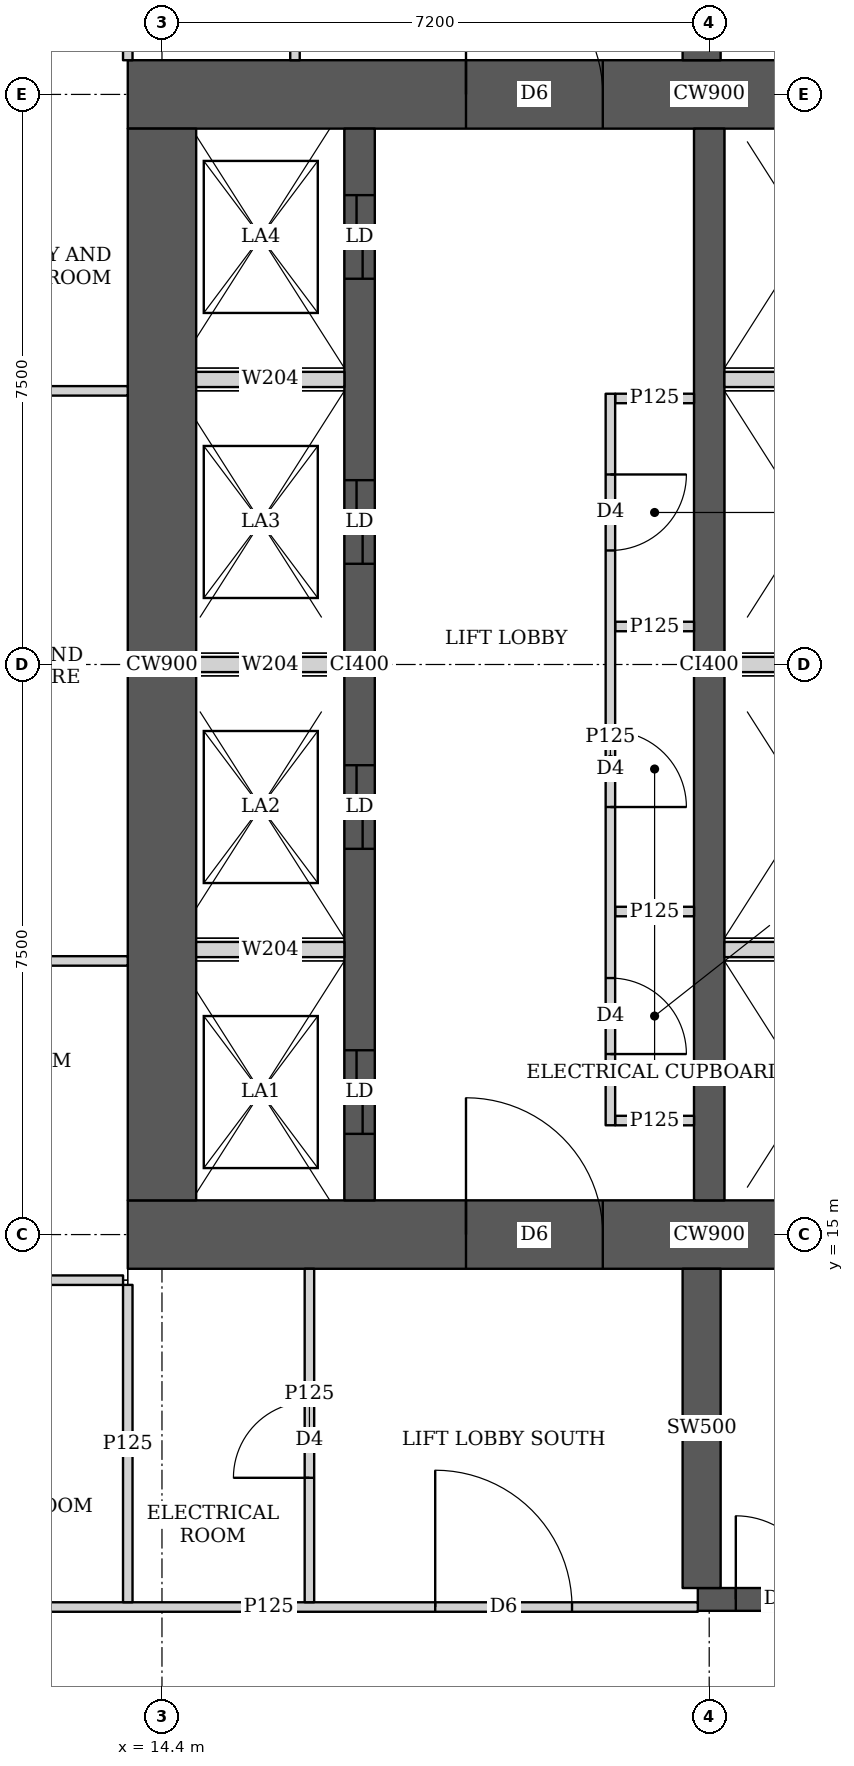
"""IFC4 building model, lengths in metres.
Left out: names, types, materials, properties, quantities, classifications, styles, units other than length and angle.
Written with IfcOpenShell. Run it as: python <this file> out.ifc"""

import sys

from ifc_helpers import new_model, si_unit, direction, frame, frame_2d, origin, place, context, subcontext, project, spatial, rectangle, extrude, element, fill, save


model = new_model("IFC4")
c1 = context("Model", 3, precision=1e-05, world=origin(), true_north=direction((0.0, 1.0)))
c2 = subcontext(c1, "Body", "Model", "MODEL_VIEW")
j1 = project(units=[si_unit("LENGTHUNIT", "METRE"), si_unit("PLANEANGLEUNIT", "RADIAN")], contexts=[c1])
p1 = place(None, origin())
s1 = spatial("IfcSite", under=j1, at=p1, CompositionType="ELEMENT")
p2 = place(p1, origin())
s2 = spatial("IfcBuilding", under=s1, at=p2, CompositionType="ELEMENT")
p3 = place(p2, frame((0.0, 0.0, 81.65)))
s3 = spatial("IfcBuildingStorey", under=s2, at=p3, CompositionType="ELEMENT", Elevation=81.65)
p4 = place(p3, frame((13.95, 15.0, 0.0), z_axis=(0.0, 0.0, 1.0), x_axis=(1.0, 0.0, 0.0)))
e1 = element("IfcWall", 1, at=p4, inside=s3, PredefinedType="SHEAR", context=c2, shape_type="SweptSolid", body=[
    extrude(rectangle(XDim=15.3, YDim=0.9, at=frame_2d((7.65, 0.0))), origin(), (0.0, 0.0, 1.0), 3.75),
])
p5 = place(p4, frame((4.45, 0.0, 0.0)))
e2 = element("IfcOpeningElement", 2, at=p5, cuts=e1, PredefinedType="OPENING", context=c2, shape_type="SweptSolid", body=[
    extrude(rectangle(XDim=1.8, YDim=2.1, at=frame_2d((0.9, 1.05))), frame((0.0, 0.46, 0.0), z_axis=(0.0, -1.0, 0.0), x_axis=(1.0, 0.0, 0.0)), (0.0, 0.0, 1.0), 0.92),
])
p6 = place(p4, frame((10.7, 0.0, 0.0)))
e3 = element("IfcOpeningElement", 3, at=p6, cuts=e1, PredefinedType="OPENING", context=c2, shape_type="SweptSolid", body=[
    extrude(rectangle(XDim=1.1, YDim=2.1, at=frame_2d((0.55, 1.05))), frame((0.0, 0.46, 0.0), z_axis=(0.0, -1.0, 0.0), x_axis=(1.0, 0.0, 0.0)), (0.0, 0.0, 1.0), 0.92),
])
p7 = place(p3, frame((13.95, 30.0, 0.0), z_axis=(0.0, 0.0, 1.0), x_axis=(1.0, 0.0, 0.0)))
e4 = element("IfcWall", 4, at=p7, inside=s3, PredefinedType="SHEAR", context=c2, shape_type="SweptSolid", body=[
    extrude(rectangle(XDim=15.3, YDim=0.9, at=frame_2d((7.65, 0.0))), origin(), (0.0, 0.0, 1.0), 3.75),
])
p8 = place(p7, frame((4.45, 0.0, 0.0)))
e5 = element("IfcOpeningElement", 5, at=p8, cuts=e4, PredefinedType="OPENING", context=c2, shape_type="SweptSolid", body=[
    extrude(rectangle(XDim=1.8, YDim=2.1, at=frame_2d((0.9, 1.05))), frame((0.0, 0.46, 0.0), z_axis=(0.0, -1.0, 0.0), x_axis=(1.0, 0.0, 0.0)), (0.0, 0.0, 1.0), 0.92),
])
p9 = place(p7, frame((10.7, 0.0, 0.0)))
e6 = element("IfcOpeningElement", 6, at=p9, cuts=e4, PredefinedType="OPENING", context=c2, shape_type="SweptSolid", body=[
    extrude(rectangle(XDim=1.1, YDim=2.1, at=frame_2d((0.55, 1.05))), frame((0.0, 0.46, 0.0), z_axis=(0.0, -1.0, 0.0), x_axis=(1.0, 0.0, 0.0)), (0.0, 0.0, 1.0), 0.92),
])
p10 = place(p3, frame((14.4, 15.45, 0.0), z_axis=(0.0, 0.0, 1.0), x_axis=(0.0, 1.0, 0.0)))
e7 = element("IfcWall", 7, at=p10, inside=s3, PredefinedType="SHEAR", context=c2, shape_type="SweptSolid", body=[
    extrude(rectangle(XDim=14.1, YDim=0.9, at=frame_2d((7.05, 0.0))), origin(), (0.0, 0.0, 1.0), 3.75),
])
p11 = place(p3, frame((17.0, 15.45, 0.0), z_axis=(0.0, 0.0, 1.0), x_axis=(0.0, 1.0, 0.0)))
e8 = element("IfcWall", 8, at=p11, inside=s3, PredefinedType="SHEAR", context=c2, shape_type="SweptSolid", body=[
    extrude(rectangle(XDim=14.1, YDim=0.4, at=frame_2d((7.05, 0.0))), origin(), (0.0, 0.0, 1.0), 3.75),
])
p12 = place(p11, frame((0.875, 0.0, 0.0)))
e9 = element("IfcOpeningElement", 9, at=p12, cuts=e8, PredefinedType="OPENING", context=c2, shape_type="SweptSolid", body=[
    extrude(rectangle(XDim=1.1, YDim=2.1, at=frame_2d((0.55, 1.05))), frame((0.0, 0.21, 0.0), z_axis=(0.0, -1.0, 0.0), x_axis=(1.0, 0.0, 0.0)), (0.0, 0.0, 1.0), 0.42),
])
p13 = place(p11, frame((4.625, 0.0, 0.0)))
e10 = element("IfcOpeningElement", 10, at=p13, cuts=e8, PredefinedType="OPENING", context=c2, shape_type="SweptSolid", body=[
    extrude(rectangle(XDim=1.1, YDim=2.1, at=frame_2d((0.55, 1.05))), frame((0.0, 0.21, 0.0), z_axis=(0.0, -1.0, 0.0), x_axis=(1.0, 0.0, 0.0)), (0.0, 0.0, 1.0), 0.42),
])
p14 = place(p11, frame((8.375, 0.0, 0.0)))
e11 = element("IfcOpeningElement", 11, at=p14, cuts=e8, PredefinedType="OPENING", context=c2, shape_type="SweptSolid", body=[
    extrude(rectangle(XDim=1.1, YDim=2.1, at=frame_2d((0.55, 1.05))), frame((0.0, 0.21, 0.0), z_axis=(0.0, -1.0, 0.0), x_axis=(1.0, 0.0, 0.0)), (0.0, 0.0, 1.0), 0.42),
])
p15 = place(p11, frame((12.125, 0.0, 0.0)))
e12 = element("IfcOpeningElement", 12, at=p15, cuts=e8, PredefinedType="OPENING", context=c2, shape_type="SweptSolid", body=[
    extrude(rectangle(XDim=1.1, YDim=2.1, at=frame_2d((0.55, 1.05))), frame((0.0, 0.21, 0.0), z_axis=(0.0, -1.0, 0.0), x_axis=(1.0, 0.0, 0.0)), (0.0, 0.0, 1.0), 0.42),
])
p16 = place(p3, frame((21.6, 15.45, 0.0), z_axis=(0.0, 0.0, 1.0), x_axis=(0.0, 1.0, 0.0)))
e13 = element("IfcWall", 13, at=p16, inside=s3, PredefinedType="SHEAR", context=c2, shape_type="SweptSolid", body=[
    extrude(rectangle(XDim=14.1, YDim=0.4, at=frame_2d((7.05, 0.0))), origin(), (0.0, 0.0, 1.0), 3.75),
])
p17 = place(p3, frame((21.45, 10.2, 0.0), z_axis=(0.0, 0.0, 1.0), x_axis=(1.0, 0.0, 0.0)))
e14 = element("IfcWall", 14, at=p17, inside=s3, PredefinedType="SHEAR", context=c2, shape_type="SweptSolid", body=[
    extrude(rectangle(XDim=7.5, YDim=0.3, at=frame_2d((3.75, 0.0))), origin(), (0.0, 0.0, 1.0), 3.75),
])
p18 = place(p17, frame((0.5, 0.0, 0.0)))
e15 = element("IfcOpeningElement", 15, at=p18, cuts=e14, PredefinedType="OPENING", context=c2, shape_type="SweptSolid", body=[
    extrude(rectangle(XDim=1.1, YDim=2.1, at=frame_2d((0.55, 1.05))), frame((0.0, 0.16, 0.0), z_axis=(0.0, -1.0, 0.0), x_axis=(1.0, 0.0, 0.0)), (0.0, 0.0, 1.0), 0.32),
])
for number, where, z_axis, x_axis in (
    (16, (21.5, 10.35, 0.0), (0.0, 0.0, 1.0), (0.0, 1.0, 0.0)),
    (17, (21.5, 30.45, 0.0), (0.0, 0.0, 1.0), (0.0, 1.0, 0.0)),
):
    element("IfcWall", number, at=place(p3, frame(where, z_axis=z_axis, x_axis=x_axis)), inside=s3, PredefinedType="SHEAR", context=c2, shape_type="SweptSolid", body=[
        extrude(rectangle(XDim=4.2, YDim=0.5, at=frame_2d((2.1, 0.0))), origin(), (0.0, 0.0, 1.0), 3.75),
    ])
p19 = place(p3, frame((10.163, 14.4, 0.0), z_axis=(0.0, 0.0, 1.0), x_axis=(1.0, 0.0, 0.0)))
e18 = element("IfcWall", 18, at=p19, inside=s3, PredefinedType="PARTITIONING", context=c2, shape_type="SweptSolid", body=[
    extrude(rectangle(XDim=3.725, YDim=0.125, at=frame_2d((1.862, 0.0))), origin(), (0.0, 0.0, 1.0), 3.5),
])
for number, where, z_axis, x_axis in (
    (19, (10.163, 18.6, 0.0), (0.0, 0.0, 1.0), (1.0, 0.0, 0.0)),
    (20, (10.163, 26.1, 0.0), (0.0, 0.0, 1.0), (1.0, 0.0, 0.0)),
):
    element("IfcWall", number, at=place(p3, frame(where, z_axis=z_axis, x_axis=x_axis)), inside=s3, PredefinedType="PARTITIONING", context=c2, shape_type="SweptSolid", body=[
        extrude(rectangle(XDim=3.787, YDim=0.125, at=frame_2d((1.894, 0.0))), origin(), (0.0, 0.0, 1.0), 3.5),
    ])
p20 = place(p3, frame((13.95, 10.163, 0.0), z_axis=(0.0, 0.0, 1.0), x_axis=(0.0, 1.0, 0.0)))
e21 = element("IfcWall", 21, at=p20, inside=s3, PredefinedType="PARTITIONING", context=c2, shape_type="SweptSolid", body=[
    extrude(rectangle(XDim=4.175, YDim=0.125, at=frame_2d((2.087, 0.0))), origin(), (0.0, 0.0, 1.0), 3.5),
])
p21 = place(p3, frame((13.95, 30.45, 0.0), z_axis=(0.0, 0.0, 1.0), x_axis=(0.0, 1.0, 0.0)))
e22 = element("IfcWall", 22, at=p21, inside=s3, PredefinedType="PARTITIONING", context=c2, shape_type="SweptSolid", body=[
    extrude(rectangle(XDim=4.387, YDim=0.125, at=frame_2d((2.193, 0.0))), origin(), (0.0, 0.0, 1.0), 3.5),
])
p22 = place(p3, frame((10.163, 10.1, 0.0), z_axis=(0.0, 0.0, 1.0), x_axis=(1.0, 0.0, 0.0)))
e23 = element("IfcWall", 23, at=p22, inside=s3, PredefinedType="PARTITIONING", context=c2, shape_type="SweptSolid", body=[
    extrude(rectangle(XDim=11.287, YDim=0.125, at=frame_2d((5.644, 0.0))), origin(), (0.0, 0.0, 1.0), 3.5),
])
p23 = place(p22, frame((7.832, 0.0, 0.0)))
e24 = element("IfcOpeningElement", 24, at=p23, cuts=e23, PredefinedType="OPENING", context=c2, shape_type="SweptSolid", body=[
    extrude(rectangle(XDim=1.8, YDim=2.1, at=frame_2d((0.9, 1.05))), frame((0.0, 0.073, 0.0), z_axis=(0.0, -1.0, 0.0), x_axis=(1.0, 0.0, 0.0)), (0.0, 0.0, 1.0), 0.145),
])
p24 = place(p3, frame((16.34, 10.163, 0.0), z_axis=(0.0, 0.0, 1.0), x_axis=(0.0, 1.0, 0.0)))
e25 = element("IfcWall", 25, at=p24, inside=s3, PredefinedType="PARTITIONING", context=c2, shape_type="SweptSolid", body=[
    extrude(rectangle(XDim=4.387, YDim=0.125, at=frame_2d((2.193, 0.0))), origin(), (0.0, 0.0, 1.0), 3.5),
])
p25 = place(p24, frame((1.637, 0.0, 0.0)))
e26 = element("IfcOpeningElement", 26, at=p25, cuts=e25, PredefinedType="OPENING", context=c2, shape_type="SweptSolid", body=[
    extrude(rectangle(XDim=1.0, YDim=2.1, at=frame_2d((0.5, 1.05))), frame((0.0, 0.073, 0.0), z_axis=(0.0, -1.0, 0.0), x_axis=(1.0, 0.0, 0.0)), (0.0, 0.0, 1.0), 0.145),
])
p26 = place(p3, frame((16.15, 30.45, 0.0), z_axis=(0.0, 0.0, 1.0), x_axis=(0.0, 1.0, 0.0)))
e27 = element("IfcWall", 27, at=p26, inside=s3, PredefinedType="PARTITIONING", context=c2, shape_type="SweptSolid", body=[
    extrude(rectangle(XDim=4.387, YDim=0.125, at=frame_2d((2.193, 0.0))), origin(), (0.0, 0.0, 1.0), 3.5),
])
p27 = place(p26, frame((1.75, 0.0, 0.0)))
e28 = element("IfcOpeningElement", 28, at=p27, cuts=e27, PredefinedType="OPENING", context=c2, shape_type="SweptSolid", body=[
    extrude(rectangle(XDim=1.0, YDim=2.1, at=frame_2d((0.5, 1.05))), frame((0.0, 0.073, 0.0), z_axis=(0.0, -1.0, 0.0), x_axis=(1.0, 0.0, 0.0)), (0.0, 0.0, 1.0), 0.145),
])
p28 = place(p3, frame((20.3, 16.438, 0.0), z_axis=(0.0, 0.0, 1.0), x_axis=(0.0, 1.0, 0.0)))
e29 = element("IfcWall", 29, at=p28, inside=s3, PredefinedType="PARTITIONING", context=c2, shape_type="SweptSolid", body=[
    extrude(rectangle(XDim=9.624, YDim=0.125, at=frame_2d((4.812, 0.0))), origin(), (0.0, 0.0, 1.0), 3.5),
])
p29 = place(p28, frame((0.937, 0.0, 0.0)))
e30 = element("IfcOpeningElement", 30, at=p29, cuts=e29, PredefinedType="OPENING", context=c2, shape_type="SweptSolid", body=[
    extrude(rectangle(XDim=1.0, YDim=2.1, at=frame_2d((0.5, 1.05))), frame((0.0, 0.073, 0.0), z_axis=(0.0, -1.0, 0.0), x_axis=(1.0, 0.0, 0.0)), (0.0, 0.0, 1.0), 0.145),
])
p30 = place(p28, frame((4.187, 0.0, 0.0)))
e31 = element("IfcOpeningElement", 31, at=p30, cuts=e29, PredefinedType="OPENING", context=c2, shape_type="SweptSolid", body=[
    extrude(rectangle(XDim=1.0, YDim=2.1, at=frame_2d((0.5, 1.05))), frame((0.0, 0.073, 0.0), z_axis=(0.0, -1.0, 0.0), x_axis=(1.0, 0.0, 0.0)), (0.0, 0.0, 1.0), 0.145),
])
p31 = place(p28, frame((7.562, 0.0, 0.0)))
e32 = element("IfcOpeningElement", 32, at=p31, cuts=e29, PredefinedType="OPENING", context=c2, shape_type="SweptSolid", body=[
    extrude(rectangle(XDim=1.0, YDim=2.1, at=frame_2d((0.5, 1.05))), frame((0.0, 0.073, 0.0), z_axis=(0.0, -1.0, 0.0), x_axis=(1.0, 0.0, 0.0)), (0.0, 0.0, 1.0), 0.145),
])
for number, where, z_axis, x_axis in (
    (33, (20.363, 16.5, 0.0), (0.0, 0.0, 1.0), (1.0, 0.0, 0.0)),
    (34, (20.363, 26.0, 0.0), (0.0, 0.0, 1.0), (1.0, 0.0, 0.0)),
    (35, (20.363, 19.25, 0.0), (0.0, 0.0, 1.0), (1.0, 0.0, 0.0)),
    (36, (20.363, 23.0, 0.0), (0.0, 0.0, 1.0), (1.0, 0.0, 0.0)),
):
    element("IfcWall", number, at=place(p3, frame(where, z_axis=z_axis, x_axis=x_axis)), inside=s3, PredefinedType="PARTITIONING", context=c2, shape_type="SweptSolid", body=[
        extrude(rectangle(XDim=1.037, YDim=0.125, at=frame_2d((0.519, 0.0))), origin(), (0.0, 0.0, 1.0), 3.5),
    ])
p32 = place(p3, frame((14.85, 18.75, 0.0), z_axis=(0.0, 0.0, 1.0), x_axis=(1.0, 0.0, 0.0)))
e37 = element("IfcWall", 37, at=p32, inside=s3, PredefinedType="SOLIDWALL", context=c2, shape_type="SweptSolid", body=[
    extrude(rectangle(XDim=1.95, YDim=0.2, at=frame_2d((0.975, 0.0))), origin(), (0.0, 0.0, 1.0), 3.5),
])
p33 = place(p3, frame((21.8, 18.75, 0.0), z_axis=(0.0, 0.0, 1.0), x_axis=(1.0, 0.0, 0.0)))
e38 = element("IfcWall", 38, at=p33, inside=s3, PredefinedType="SOLIDWALL", context=c2, shape_type="SweptSolid", body=[
    extrude(rectangle(XDim=2.2, YDim=0.2, at=frame_2d((1.1, 0.0))), origin(), (0.0, 0.0, 1.0), 3.5),
])
p34 = place(p3, frame((14.85, 22.5, 0.0), z_axis=(0.0, 0.0, 1.0), x_axis=(1.0, 0.0, 0.0)))
e39 = element("IfcWall", 39, at=p34, inside=s3, PredefinedType="SOLIDWALL", context=c2, shape_type="SweptSolid", body=[
    extrude(rectangle(XDim=1.95, YDim=0.2, at=frame_2d((0.975, 0.0))), origin(), (0.0, 0.0, 1.0), 3.5),
])
p35 = place(p3, frame((21.8, 22.5, 0.0), z_axis=(0.0, 0.0, 1.0), x_axis=(1.0, 0.0, 0.0)))
e40 = element("IfcWall", 40, at=p35, inside=s3, PredefinedType="SOLIDWALL", context=c2, shape_type="SweptSolid", body=[
    extrude(rectangle(XDim=2.2, YDim=0.2, at=frame_2d((1.1, 0.0))), origin(), (0.0, 0.0, 1.0), 3.5),
])
p36 = place(p3, frame((14.85, 26.25, 0.0), z_axis=(0.0, 0.0, 1.0), x_axis=(1.0, 0.0, 0.0)))
e41 = element("IfcWall", 41, at=p36, inside=s3, PredefinedType="SOLIDWALL", context=c2, shape_type="SweptSolid", body=[
    extrude(rectangle(XDim=1.95, YDim=0.2, at=frame_2d((0.975, 0.0))), origin(), (0.0, 0.0, 1.0), 3.5),
])
p37 = place(p3, frame((21.8, 26.25, 0.0), z_axis=(0.0, 0.0, 1.0), x_axis=(1.0, 0.0, 0.0)))
e42 = element("IfcWall", 42, at=p37, inside=s3, PredefinedType="SOLIDWALL", context=c2, shape_type="SweptSolid", body=[
    extrude(rectangle(XDim=2.2, YDim=0.2, at=frame_2d((1.1, 0.0))), origin(), (0.0, 0.0, 1.0), 3.5),
])
p38 = place(p25, origin())
e43 = element("IfcDoor", 43, at=p38, inside=s3, OperationType="SINGLE_SWING_LEFT", PredefinedType="DOOR", context=c2, shape_type="SweptSolid", body=[
    extrude(rectangle(XDim=1.0, YDim=2.1, at=frame_2d((0.5, 1.05))), frame((0.0, 0.025, 0.0), z_axis=(0.0, -1.0, 0.0), x_axis=(1.0, 0.0, 0.0)), (0.0, 0.0, 1.0), 0.05),
])
fill(e26, e43)
p39 = place(p23, origin())
e44 = element("IfcDoor", 44, at=p39, inside=s3, OperationType="DOUBLE_DOOR_SINGLE_SWING", PredefinedType="DOOR", context=c2, shape_type="SweptSolid", body=[
    extrude(rectangle(XDim=1.8, YDim=2.1, at=frame_2d((0.9, 1.05))), frame((0.0, 0.025, 0.0), z_axis=(0.0, -1.0, 0.0), x_axis=(1.0, 0.0, 0.0)), (0.0, 0.0, 1.0), 0.05),
])
fill(e24, e44)
p40 = place(p29, origin())
e45 = element("IfcDoor", 45, at=p40, inside=s3, OperationType="SINGLE_SWING_RIGHT", PredefinedType="DOOR", context=c2, shape_type="SweptSolid", body=[
    extrude(rectangle(XDim=1.0, YDim=2.1, at=frame_2d((0.5, 1.05))), frame((0.0, 0.025, 0.0), z_axis=(0.0, -1.0, 0.0), x_axis=(1.0, 0.0, 0.0)), (0.0, 0.0, 1.0), 0.05),
])
fill(e30, e45)
p41 = place(p30, origin())
e46 = element("IfcDoor", 46, at=p41, inside=s3, OperationType="SINGLE_SWING_RIGHT", PredefinedType="DOOR", context=c2, shape_type="SweptSolid", body=[
    extrude(rectangle(XDim=1.0, YDim=2.1, at=frame_2d((0.5, 1.05))), frame((0.0, 0.025, 0.0), z_axis=(0.0, -1.0, 0.0), x_axis=(1.0, 0.0, 0.0)), (0.0, 0.0, 1.0), 0.05),
])
fill(e31, e46)
p42 = place(p31, origin())
e47 = element("IfcDoor", 47, at=p42, inside=s3, OperationType="SINGLE_SWING_LEFT", PredefinedType="DOOR", context=c2, shape_type="SweptSolid", body=[
    extrude(rectangle(XDim=1.0, YDim=2.1, at=frame_2d((0.5, 1.05))), frame((0.0, 0.025, 0.0), z_axis=(0.0, -1.0, 0.0), x_axis=(1.0, 0.0, 0.0)), (0.0, 0.0, 1.0), 0.05),
])
fill(e32, e47)
p43 = place(p5, origin())
e48 = element("IfcDoor", 48, at=p43, inside=s3, OperationType="DOUBLE_DOOR_SINGLE_SWING", PredefinedType="DOOR", context=c2, shape_type="SweptSolid", body=[
    extrude(rectangle(XDim=1.8, YDim=2.1, at=frame_2d((0.9, 1.05))), frame((0.0, 0.025, 0.0), z_axis=(0.0, -1.0, 0.0), x_axis=(1.0, 0.0, 0.0)), (0.0, 0.0, 1.0), 0.05),
])
fill(e2, e48)
p44 = place(p8, origin())
e49 = element("IfcDoor", 49, at=p44, inside=s3, OperationType="DOUBLE_DOOR_SINGLE_SWING", PredefinedType="DOOR", context=c2, shape_type="SweptSolid", body=[
    extrude(rectangle(XDim=1.8, YDim=2.1, at=frame_2d((0.9, 1.05))), frame((0.0, 0.025, 0.0), z_axis=(0.0, -1.0, 0.0), x_axis=(1.0, 0.0, 0.0)), (0.0, 0.0, 1.0), 0.05),
])
fill(e5, e49)
p45 = place(p12, origin())
e50 = element("IfcDoor", 50, at=p45, inside=s3, OperationType="DOUBLE_DOOR_SLIDING", PredefinedType="DOOR", context=c2, shape_type="SweptSolid", body=[
    extrude(rectangle(XDim=1.1, YDim=2.1, at=frame_2d((0.55, 1.05))), frame((0.0, 0.025, 0.0), z_axis=(0.0, -1.0, 0.0), x_axis=(1.0, 0.0, 0.0)), (0.0, 0.0, 1.0), 0.05),
])
fill(e9, e50)
p46 = place(p13, origin())
e51 = element("IfcDoor", 51, at=p46, inside=s3, OperationType="DOUBLE_DOOR_SLIDING", PredefinedType="DOOR", context=c2, shape_type="SweptSolid", body=[
    extrude(rectangle(XDim=1.1, YDim=2.1, at=frame_2d((0.55, 1.05))), frame((0.0, 0.025, 0.0), z_axis=(0.0, -1.0, 0.0), x_axis=(1.0, 0.0, 0.0)), (0.0, 0.0, 1.0), 0.05),
])
fill(e10, e51)
p47 = place(p14, origin())
e52 = element("IfcDoor", 52, at=p47, inside=s3, OperationType="DOUBLE_DOOR_SLIDING", PredefinedType="DOOR", context=c2, shape_type="SweptSolid", body=[
    extrude(rectangle(XDim=1.1, YDim=2.1, at=frame_2d((0.55, 1.05))), frame((0.0, 0.025, 0.0), z_axis=(0.0, -1.0, 0.0), x_axis=(1.0, 0.0, 0.0)), (0.0, 0.0, 1.0), 0.05),
])
fill(e11, e52)
p48 = place(p15, origin())
e53 = element("IfcDoor", 53, at=p48, inside=s3, OperationType="DOUBLE_DOOR_SLIDING", PredefinedType="DOOR", context=c2, shape_type="SweptSolid", body=[
    extrude(rectangle(XDim=1.1, YDim=2.1, at=frame_2d((0.55, 1.05))), frame((0.0, 0.025, 0.0), z_axis=(0.0, -1.0, 0.0), x_axis=(1.0, 0.0, 0.0)), (0.0, 0.0, 1.0), 0.05),
])
fill(e12, e53)
p49 = place(p18, origin())
e54 = element("IfcDoor", 54, at=p49, inside=s3, OperationType="SINGLE_SWING_LEFT", PredefinedType="DOOR", context=c2, shape_type="SweptSolid", body=[
    extrude(rectangle(XDim=1.1, YDim=2.1, at=frame_2d((0.55, 1.05))), frame((0.0, 0.025, 0.0), z_axis=(0.0, -1.0, 0.0), x_axis=(1.0, 0.0, 0.0)), (0.0, 0.0, 1.0), 0.05),
])
fill(e15, e54)
save(model, sys.argv[1])
